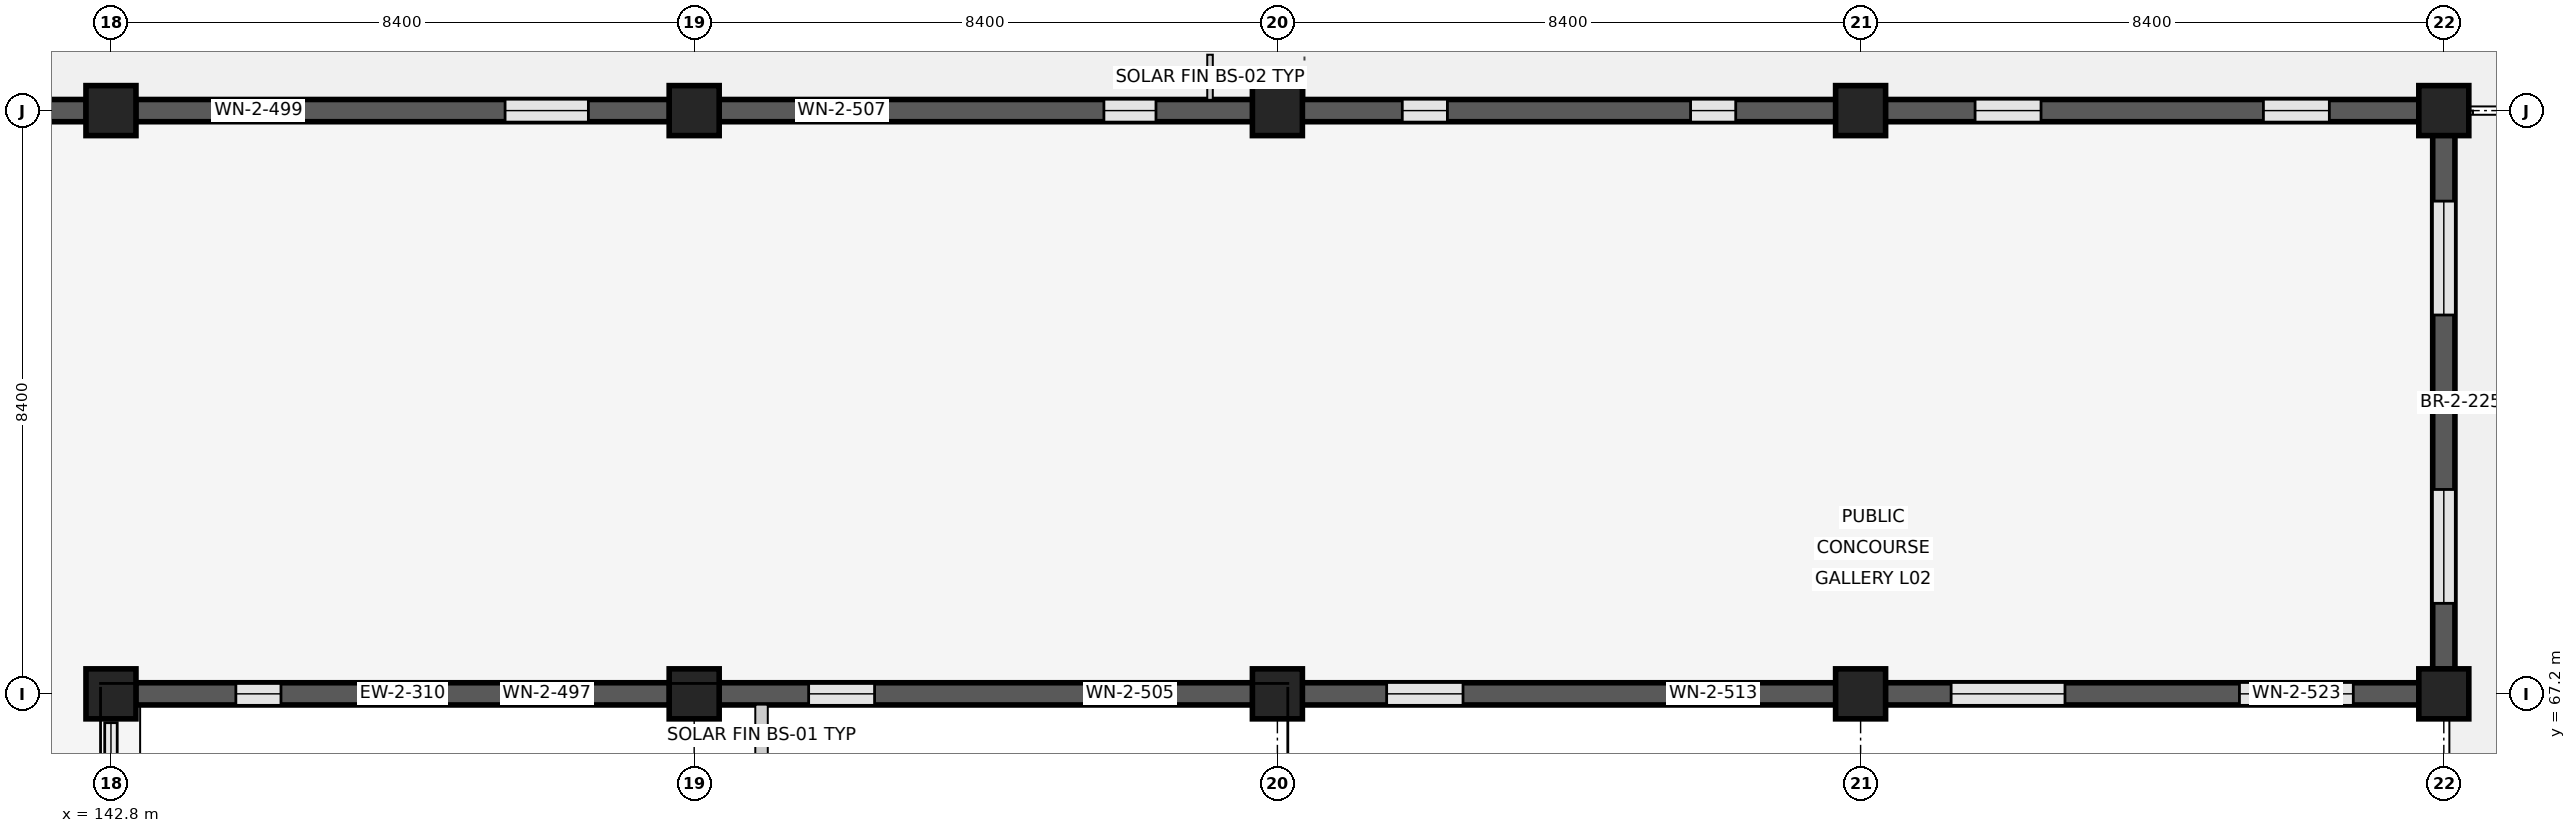
"""IFC4 building model, lengths in metres.
Left out: names, types, materials, properties, quantities, classifications, styles, units other than length and angle.
Written with IfcOpenShell. Run it as: python <this file> out.ifc"""

import sys

from ifc_helpers import new_model, si_unit, direction, frame, frame_2d, origin, origin_2d, place, context, subcontext, project, spatial, rectangle, extrude, element, fill, save


model = new_model("IFC4")
c1 = context("Model", 3, precision=1e-05, world=origin(), true_north=direction((0.0, 1.0)))
c2 = subcontext(c1, "Body", "Model", "MODEL_VIEW")
j1 = project(units=[si_unit("LENGTHUNIT", "METRE"), si_unit("PLANEANGLEUNIT", "RADIAN")], contexts=[c1])
p1 = place(None, origin())
s1 = spatial("IfcSite", under=j1, at=p1, CompositionType="ELEMENT")
p2 = place(p1, origin())
s2 = spatial("IfcBuilding", under=s1, at=p2, CompositionType="ELEMENT")
p3 = place(p2, frame((0.0, 0.0, 8.1)))
s3 = spatial("IfcBuildingStorey", under=s2, at=p3, CompositionType="ELEMENT", Elevation=8.1)
for number, where, z_axis, x_axis in (
    (1, (142.8, 67.2, 0.0), (0.0, 0.0, 1.0), (1.0, 0.0, 0.0)),
    (2, (142.8, 75.6, 0.0), (0.0, 0.0, 1.0), (1.0, 0.0, 0.0)),
    (3, (151.2, 67.2, 0.0), (0.0, 0.0, 1.0), (1.0, 0.0, 0.0)),
    (4, (151.2, 75.6, 0.0), (0.0, 0.0, 1.0), (1.0, 0.0, 0.0)),
    (5, (159.6, 67.2, 0.0), (0.0, 0.0, 1.0), (1.0, 0.0, 0.0)),
    (6, (159.6, 75.6, 0.0), (0.0, 0.0, 1.0), (1.0, 0.0, 0.0)),
    (7, (168.0, 67.2, 0.0), (0.0, 0.0, 1.0), (1.0, 0.0, 0.0)),
    (8, (168.0, 75.6, 0.0), (0.0, 0.0, 1.0), (1.0, 0.0, 0.0)),
    (9, (176.4, 67.2, 0.0), (0.0, 0.0, 1.0), (1.0, 0.0, 0.0)),
    (10, (176.4, 75.6, 0.0), (0.0, 0.0, 1.0), (1.0, 0.0, 0.0)),
):
    element("IfcColumn", number, at=place(p3, frame(where, z_axis=z_axis, x_axis=x_axis)), inside=s3, PredefinedType="COLUMN", context=c2, shape_type="SweptSolid", body=[
        extrude(rectangle(XDim=0.72, YDim=0.72, at=origin_2d()), origin(), (0.0, 0.0, 1.0), 4.8),
    ])
p4 = place(p3, frame((134.755, 75.6, 0.0), z_axis=(0.0, 0.0, 1.0), x_axis=(1.0, 0.0, 0.0)))
e11 = element("IfcWall", 11, at=p4, inside=s3, PredefinedType="SOLIDWALL", context=c2, shape_type="SweptSolid", body=[
    extrude(rectangle(XDim=7.69, YDim=0.32, at=frame_2d((3.845, 0.0))), origin(), (0.0, 0.0, 1.0), 3.86),
])
p5 = place(p4, frame((1.094, 0.0, 0.85)))
e12 = element("IfcOpeningElement", 12, at=p5, cuts=e11, PredefinedType="OPENING", context=c2, shape_type="SweptSolid", body=[
    extrude(rectangle(XDim=1.35, YDim=1.55, at=frame_2d((0.675, 0.775))), frame((0.0, 0.17, 0.0), z_axis=(0.0, -1.0, 0.0), x_axis=(1.0, 0.0, 0.0)), (0.0, 0.0, 1.0), 0.34),
])
p6 = place(p4, frame((5.246, 0.0, 0.85)))
e13 = element("IfcOpeningElement", 13, at=p6, cuts=e11, PredefinedType="OPENING", context=c2, shape_type="SweptSolid", body=[
    extrude(rectangle(XDim=1.35, YDim=1.55, at=frame_2d((0.675, 0.775))), frame((0.0, 0.17, 0.0), z_axis=(0.0, -1.0, 0.0), x_axis=(1.0, 0.0, 0.0)), (0.0, 0.0, 1.0), 0.34),
])
p7 = place(p3, frame((150.845, 67.2, 0.0), z_axis=(0.0, 0.0, 1.0), x_axis=(-1.0, 0.0, 0.0)))
e14 = element("IfcWall", 14, at=p7, inside=s3, PredefinedType="SOLIDWALL", context=c2, shape_type="SweptSolid", body=[
    extrude(rectangle(XDim=7.69, YDim=0.32, at=frame_2d((3.845, 0.0))), origin(), (0.0, 0.0, 1.0), 3.86),
])
p8 = place(p7, frame((1.444, 0.0, 0.85)))
e15 = element("IfcOpeningElement", 15, at=p8, cuts=e14, PredefinedType="OPENING", context=c2, shape_type="SweptSolid", body=[
    extrude(rectangle(XDim=0.65, YDim=1.75, at=frame_2d((0.325, 0.875))), frame((0.0, 0.17, 0.0), z_axis=(0.0, -1.0, 0.0), x_axis=(1.0, 0.0, 0.0)), (0.0, 0.0, 1.0), 0.34),
])
p9 = place(p7, frame((5.596, 0.0, 0.85)))
e16 = element("IfcOpeningElement", 16, at=p9, cuts=e14, PredefinedType="OPENING", context=c2, shape_type="SweptSolid", body=[
    extrude(rectangle(XDim=0.65, YDim=1.75, at=frame_2d((0.325, 0.875))), frame((0.0, 0.17, 0.0), z_axis=(0.0, -1.0, 0.0), x_axis=(1.0, 0.0, 0.0)), (0.0, 0.0, 1.0), 0.34),
])
p10 = place(p3, frame((143.155, 75.6, 0.0), z_axis=(0.0, 0.0, 1.0), x_axis=(1.0, 0.0, 0.0)))
e17 = element("IfcWall", 17, at=p10, inside=s3, PredefinedType="SOLIDWALL", context=c2, shape_type="SweptSolid", body=[
    extrude(rectangle(XDim=7.69, YDim=0.32, at=frame_2d((3.845, 0.0))), origin(), (0.0, 0.0, 1.0), 3.86),
])
p11 = place(p10, frame((1.169, 0.0, 0.85)))
e18 = element("IfcOpeningElement", 18, at=p11, cuts=e17, PredefinedType="OPENING", context=c2, shape_type="SweptSolid", body=[
    extrude(rectangle(XDim=1.2, YDim=1.55, at=frame_2d((0.6, 0.775))), frame((0.0, 0.17, 0.0), z_axis=(0.0, -1.0, 0.0), x_axis=(1.0, 0.0, 0.0)), (0.0, 0.0, 1.0), 0.34),
])
p12 = place(p10, frame((5.321, 0.0, 0.85)))
e19 = element("IfcOpeningElement", 19, at=p12, cuts=e17, PredefinedType="OPENING", context=c2, shape_type="SweptSolid", body=[
    extrude(rectangle(XDim=1.2, YDim=1.55, at=frame_2d((0.6, 0.775))), frame((0.0, 0.17, 0.0), z_axis=(0.0, -1.0, 0.0), x_axis=(1.0, 0.0, 0.0)), (0.0, 0.0, 1.0), 0.34),
])
p13 = place(p3, frame((159.245, 67.2, 0.0), z_axis=(0.0, 0.0, 1.0), x_axis=(-1.0, 0.0, 0.0)))
e20 = element("IfcWall", 20, at=p13, inside=s3, PredefinedType="SOLIDWALL", context=c2, shape_type="SweptSolid", body=[
    extrude(rectangle(XDim=7.69, YDim=0.32, at=frame_2d((3.845, 0.0))), origin(), (0.0, 0.0, 1.0), 3.86),
])
p14 = place(p13, frame((1.294, 0.0, 0.85)))
e21 = element("IfcOpeningElement", 21, at=p14, cuts=e20, PredefinedType="OPENING", context=c2, shape_type="SweptSolid", body=[
    extrude(rectangle(XDim=0.95, YDim=1.6, at=frame_2d((0.475, 0.8))), frame((0.0, 0.17, 0.0), z_axis=(0.0, -1.0, 0.0), x_axis=(1.0, 0.0, 0.0)), (0.0, 0.0, 1.0), 0.34),
])
p15 = place(p13, frame((5.446, 0.0, 0.85)))
e22 = element("IfcOpeningElement", 22, at=p15, cuts=e20, PredefinedType="OPENING", context=c2, shape_type="SweptSolid", body=[
    extrude(rectangle(XDim=0.95, YDim=1.6, at=frame_2d((0.475, 0.8))), frame((0.0, 0.17, 0.0), z_axis=(0.0, -1.0, 0.0), x_axis=(1.0, 0.0, 0.0)), (0.0, 0.0, 1.0), 0.34),
])
p16 = place(p3, frame((151.555, 75.6, 0.0), z_axis=(0.0, 0.0, 1.0), x_axis=(1.0, 0.0, 0.0)))
e23 = element("IfcWall", 23, at=p16, inside=s3, PredefinedType="SOLIDWALL", context=c2, shape_type="SweptSolid", body=[
    extrude(rectangle(XDim=7.69, YDim=0.32, at=frame_2d((3.845, 0.0))), origin(), (0.0, 0.0, 1.0), 3.86),
])
p17 = place(p16, frame((1.394, 0.0, 0.85)))
e24 = element("IfcOpeningElement", 24, at=p17, cuts=e23, PredefinedType="OPENING", context=c2, shape_type="SweptSolid", body=[
    extrude(rectangle(XDim=0.75, YDim=1.85, at=frame_2d((0.375, 0.925))), frame((0.0, 0.17, 0.0), z_axis=(0.0, -1.0, 0.0), x_axis=(1.0, 0.0, 0.0)), (0.0, 0.0, 1.0), 0.34),
])
p18 = place(p16, frame((5.546, 0.0, 0.85)))
e25 = element("IfcOpeningElement", 25, at=p18, cuts=e23, PredefinedType="OPENING", context=c2, shape_type="SweptSolid", body=[
    extrude(rectangle(XDim=0.75, YDim=1.85, at=frame_2d((0.375, 0.925))), frame((0.0, 0.17, 0.0), z_axis=(0.0, -1.0, 0.0), x_axis=(1.0, 0.0, 0.0)), (0.0, 0.0, 1.0), 0.34),
])
p19 = place(p3, frame((167.645, 67.2, 0.0), z_axis=(0.0, 0.0, 1.0), x_axis=(-1.0, 0.0, 0.0)))
e26 = element("IfcWall", 26, at=p19, inside=s3, PredefinedType="SOLIDWALL", context=c2, shape_type="SweptSolid", body=[
    extrude(rectangle(XDim=7.69, YDim=0.32, at=frame_2d((3.845, 0.0))), origin(), (0.0, 0.0, 1.0), 3.86),
])
p20 = place(p19, frame((1.219, 0.0, 0.85)))
e27 = element("IfcOpeningElement", 27, at=p20, cuts=e26, PredefinedType="OPENING", context=c2, shape_type="SweptSolid", body=[
    extrude(rectangle(XDim=1.1, YDim=1.6, at=frame_2d((0.55, 0.8))), frame((0.0, 0.17, 0.0), z_axis=(0.0, -1.0, 0.0), x_axis=(1.0, 0.0, 0.0)), (0.0, 0.0, 1.0), 0.34),
])
p21 = place(p19, frame((5.371, 0.0, 0.85)))
e28 = element("IfcOpeningElement", 28, at=p21, cuts=e26, PredefinedType="OPENING", context=c2, shape_type="SweptSolid", body=[
    extrude(rectangle(XDim=1.1, YDim=1.6, at=frame_2d((0.55, 0.8))), frame((0.0, 0.17, 0.0), z_axis=(0.0, -1.0, 0.0), x_axis=(1.0, 0.0, 0.0)), (0.0, 0.0, 1.0), 0.34),
])
p22 = place(p3, frame((159.955, 75.6, 0.0), z_axis=(0.0, 0.0, 1.0), x_axis=(1.0, 0.0, 0.0)))
e29 = element("IfcWall", 29, at=p22, inside=s3, PredefinedType="SOLIDWALL", context=c2, shape_type="SweptSolid", body=[
    extrude(rectangle(XDim=7.69, YDim=0.32, at=frame_2d((3.845, 0.0))), origin(), (0.0, 0.0, 1.0), 3.86),
])
p23 = place(p22, frame((1.444, 0.0, 0.85)))
e30 = element("IfcOpeningElement", 30, at=p23, cuts=e29, PredefinedType="OPENING", context=c2, shape_type="SweptSolid", body=[
    extrude(rectangle(XDim=0.65, YDim=1.75, at=frame_2d((0.325, 0.875))), frame((0.0, 0.17, 0.0), z_axis=(0.0, -1.0, 0.0), x_axis=(1.0, 0.0, 0.0)), (0.0, 0.0, 1.0), 0.34),
])
p24 = place(p22, frame((5.596, 0.0, 0.85)))
e31 = element("IfcOpeningElement", 31, at=p24, cuts=e29, PredefinedType="OPENING", context=c2, shape_type="SweptSolid", body=[
    extrude(rectangle(XDim=0.65, YDim=1.75, at=frame_2d((0.325, 0.875))), frame((0.0, 0.17, 0.0), z_axis=(0.0, -1.0, 0.0), x_axis=(1.0, 0.0, 0.0)), (0.0, 0.0, 1.0), 0.34),
])
p25 = place(p3, frame((176.045, 67.2, 0.0), z_axis=(0.0, 0.0, 1.0), x_axis=(-1.0, 0.0, 0.0)))
e32 = element("IfcWall", 32, at=p25, inside=s3, PredefinedType="SOLIDWALL", context=c2, shape_type="SweptSolid", body=[
    extrude(rectangle(XDim=7.69, YDim=0.32, at=frame_2d((3.845, 0.0))), origin(), (0.0, 0.0, 1.0), 3.86),
])
p26 = place(p25, frame((0.949, 0.0, 0.85)))
e33 = element("IfcOpeningElement", 33, at=p26, cuts=e32, PredefinedType="OPENING", context=c2, shape_type="SweptSolid", body=[
    extrude(rectangle(XDim=1.64, YDim=1.75, at=frame_2d((0.82, 0.875))), frame((0.0, 0.17, 0.0), z_axis=(0.0, -1.0, 0.0), x_axis=(1.0, 0.0, 0.0)), (0.0, 0.0, 1.0), 0.34),
])
p27 = place(p25, frame((5.101, 0.0, 0.85)))
e34 = element("IfcOpeningElement", 34, at=p27, cuts=e32, PredefinedType="OPENING", context=c2, shape_type="SweptSolid", body=[
    extrude(rectangle(XDim=1.64, YDim=1.75, at=frame_2d((0.82, 0.875))), frame((0.0, 0.17, 0.0), z_axis=(0.0, -1.0, 0.0), x_axis=(1.0, 0.0, 0.0)), (0.0, 0.0, 1.0), 0.34),
])
p28 = place(p3, frame((168.355, 75.6, 0.0), z_axis=(0.0, 0.0, 1.0), x_axis=(1.0, 0.0, 0.0)))
e35 = element("IfcWall", 35, at=p28, inside=s3, PredefinedType="SOLIDWALL", context=c2, shape_type="SweptSolid", body=[
    extrude(rectangle(XDim=7.69, YDim=0.32, at=frame_2d((3.845, 0.0))), origin(), (0.0, 0.0, 1.0), 3.86),
])
p29 = place(p28, frame((1.294, 0.0, 0.85)))
e36 = element("IfcOpeningElement", 36, at=p29, cuts=e35, PredefinedType="OPENING", context=c2, shape_type="SweptSolid", body=[
    extrude(rectangle(XDim=0.95, YDim=1.6, at=frame_2d((0.475, 0.8))), frame((0.0, 0.17, 0.0), z_axis=(0.0, -1.0, 0.0), x_axis=(1.0, 0.0, 0.0)), (0.0, 0.0, 1.0), 0.34),
])
p30 = place(p28, frame((5.446, 0.0, 0.85)))
e37 = element("IfcOpeningElement", 37, at=p30, cuts=e35, PredefinedType="OPENING", context=c2, shape_type="SweptSolid", body=[
    extrude(rectangle(XDim=0.95, YDim=1.6, at=frame_2d((0.475, 0.8))), frame((0.0, 0.17, 0.0), z_axis=(0.0, -1.0, 0.0), x_axis=(1.0, 0.0, 0.0)), (0.0, 0.0, 1.0), 0.34),
])
p31 = place(p3, frame((176.4, 75.245, 0.0), z_axis=(0.0, 0.0, 1.0), x_axis=(0.0, -1.0, 0.0)))
e38 = element("IfcWall", 38, at=p31, inside=s3, PredefinedType="SOLIDWALL", context=c2, shape_type="SweptSolid", body=[
    extrude(rectangle(XDim=7.69, YDim=0.32, at=frame_2d((3.845, 0.0))), origin(), (0.0, 0.0, 1.0), 3.86),
])
p32 = place(p31, frame((0.949, 0.0, 0.85)))
e39 = element("IfcOpeningElement", 39, at=p32, cuts=e38, PredefinedType="OPENING", context=c2, shape_type="SweptSolid", body=[
    extrude(rectangle(XDim=1.64, YDim=1.75, at=frame_2d((0.82, 0.875))), frame((0.0, 0.17, 0.0), z_axis=(0.0, -1.0, 0.0), x_axis=(1.0, 0.0, 0.0)), (0.0, 0.0, 1.0), 0.34),
])
p33 = place(p31, frame((5.101, 0.0, 0.85)))
e40 = element("IfcOpeningElement", 40, at=p33, cuts=e38, PredefinedType="OPENING", context=c2, shape_type="SweptSolid", body=[
    extrude(rectangle(XDim=1.64, YDim=1.75, at=frame_2d((0.82, 0.875))), frame((0.0, 0.17, 0.0), z_axis=(0.0, -1.0, 0.0), x_axis=(1.0, 0.0, 0.0)), (0.0, 0.0, 1.0), 0.34),
])
p34 = place(p3, frame((176.475, 71.4, 0.0), z_axis=(0.0, 0.0, 1.0), x_axis=(1.0, 0.0, 0.0)))
e41 = element("IfcWall", 41, at=p34, inside=s3, PredefinedType="ELEMENTEDWALL", context=c2, shape_type="SweptSolid", body=[
    extrude(rectangle(XDim=0.34, YDim=0.2, at=frame_2d((0.17, 0.0))), origin(), (0.0, 0.0, 1.0), 3.84),
])
p35 = place(p8, origin())
e42 = element("IfcWindow", 42, at=p35, inside=s3, PartitioningType="SINGLE_PANEL", PredefinedType="WINDOW", context=c2, shape_type="SweptSolid", body=[
    extrude(rectangle(XDim=0.65, YDim=1.75, at=frame_2d((0.325, 0.875))), frame((0.0, 0.03, 0.0), z_axis=(0.0, -1.0, 0.0), x_axis=(1.0, 0.0, 0.0)), (0.0, 0.0, 1.0), 0.06),
])
fill(e15, e42)
p36 = place(p9, origin())
e43 = element("IfcWindow", 43, at=p36, inside=s3, PartitioningType="SINGLE_PANEL", PredefinedType="WINDOW", context=c2, shape_type="SweptSolid", body=[
    extrude(rectangle(XDim=0.65, YDim=1.75, at=frame_2d((0.325, 0.875))), frame((0.0, 0.03, 0.0), z_axis=(0.0, -1.0, 0.0), x_axis=(1.0, 0.0, 0.0)), (0.0, 0.0, 1.0), 0.06),
])
fill(e16, e43)
p37 = place(p11, origin())
e44 = element("IfcWindow", 44, at=p37, inside=s3, PartitioningType="SINGLE_PANEL", PredefinedType="WINDOW", context=c2, shape_type="SweptSolid", body=[
    extrude(rectangle(XDim=1.2, YDim=1.55, at=frame_2d((0.6, 0.775))), frame((0.0, 0.03, 0.0), z_axis=(0.0, -1.0, 0.0), x_axis=(1.0, 0.0, 0.0)), (0.0, 0.0, 1.0), 0.06),
])
fill(e18, e44)
p38 = place(p12, origin())
e45 = element("IfcWindow", 45, at=p38, inside=s3, PartitioningType="SINGLE_PANEL", PredefinedType="WINDOW", context=c2, shape_type="SweptSolid", body=[
    extrude(rectangle(XDim=1.2, YDim=1.55, at=frame_2d((0.6, 0.775))), frame((0.0, 0.03, 0.0), z_axis=(0.0, -1.0, 0.0), x_axis=(1.0, 0.0, 0.0)), (0.0, 0.0, 1.0), 0.06),
])
fill(e19, e45)
p39 = place(p14, origin())
e46 = element("IfcWindow", 46, at=p39, inside=s3, PartitioningType="SINGLE_PANEL", PredefinedType="WINDOW", context=c2, shape_type="SweptSolid", body=[
    extrude(rectangle(XDim=0.95, YDim=1.6, at=frame_2d((0.475, 0.8))), frame((0.0, 0.03, 0.0), z_axis=(0.0, -1.0, 0.0), x_axis=(1.0, 0.0, 0.0)), (0.0, 0.0, 1.0), 0.06),
])
fill(e21, e46)
p40 = place(p15, origin())
e47 = element("IfcWindow", 47, at=p40, inside=s3, PartitioningType="SINGLE_PANEL", PredefinedType="WINDOW", context=c2, shape_type="SweptSolid", body=[
    extrude(rectangle(XDim=0.95, YDim=1.6, at=frame_2d((0.475, 0.8))), frame((0.0, 0.03, 0.0), z_axis=(0.0, -1.0, 0.0), x_axis=(1.0, 0.0, 0.0)), (0.0, 0.0, 1.0), 0.06),
])
fill(e22, e47)
p41 = place(p17, origin())
e48 = element("IfcWindow", 48, at=p41, inside=s3, PartitioningType="SINGLE_PANEL", PredefinedType="WINDOW", context=c2, shape_type="SweptSolid", body=[
    extrude(rectangle(XDim=0.75, YDim=1.85, at=frame_2d((0.375, 0.925))), frame((0.0, 0.03, 0.0), z_axis=(0.0, -1.0, 0.0), x_axis=(1.0, 0.0, 0.0)), (0.0, 0.0, 1.0), 0.06),
])
fill(e24, e48)
p42 = place(p18, origin())
e49 = element("IfcWindow", 49, at=p42, inside=s3, PartitioningType="SINGLE_PANEL", PredefinedType="WINDOW", context=c2, shape_type="SweptSolid", body=[
    extrude(rectangle(XDim=0.75, YDim=1.85, at=frame_2d((0.375, 0.925))), frame((0.0, 0.03, 0.0), z_axis=(0.0, -1.0, 0.0), x_axis=(1.0, 0.0, 0.0)), (0.0, 0.0, 1.0), 0.06),
])
fill(e25, e49)
p43 = place(p20, origin())
e50 = element("IfcWindow", 50, at=p43, inside=s3, PartitioningType="SINGLE_PANEL", PredefinedType="WINDOW", context=c2, shape_type="SweptSolid", body=[
    extrude(rectangle(XDim=1.1, YDim=1.6, at=frame_2d((0.55, 0.8))), frame((0.0, 0.03, 0.0), z_axis=(0.0, -1.0, 0.0), x_axis=(1.0, 0.0, 0.0)), (0.0, 0.0, 1.0), 0.06),
])
fill(e27, e50)
p44 = place(p21, origin())
e51 = element("IfcWindow", 51, at=p44, inside=s3, PartitioningType="SINGLE_PANEL", PredefinedType="WINDOW", context=c2, shape_type="SweptSolid", body=[
    extrude(rectangle(XDim=1.1, YDim=1.6, at=frame_2d((0.55, 0.8))), frame((0.0, 0.03, 0.0), z_axis=(0.0, -1.0, 0.0), x_axis=(1.0, 0.0, 0.0)), (0.0, 0.0, 1.0), 0.06),
])
fill(e28, e51)
p45 = place(p23, origin())
e52 = element("IfcWindow", 52, at=p45, inside=s3, PartitioningType="SINGLE_PANEL", PredefinedType="WINDOW", context=c2, shape_type="SweptSolid", body=[
    extrude(rectangle(XDim=0.65, YDim=1.75, at=frame_2d((0.325, 0.875))), frame((0.0, 0.03, 0.0), z_axis=(0.0, -1.0, 0.0), x_axis=(1.0, 0.0, 0.0)), (0.0, 0.0, 1.0), 0.06),
])
fill(e30, e52)
p46 = place(p24, origin())
e53 = element("IfcWindow", 53, at=p46, inside=s3, PartitioningType="SINGLE_PANEL", PredefinedType="WINDOW", context=c2, shape_type="SweptSolid", body=[
    extrude(rectangle(XDim=0.65, YDim=1.75, at=frame_2d((0.325, 0.875))), frame((0.0, 0.03, 0.0), z_axis=(0.0, -1.0, 0.0), x_axis=(1.0, 0.0, 0.0)), (0.0, 0.0, 1.0), 0.06),
])
fill(e31, e53)
p47 = place(p26, origin())
e54 = element("IfcWindow", 54, at=p47, inside=s3, PartitioningType="SINGLE_PANEL", PredefinedType="WINDOW", context=c2, shape_type="SweptSolid", body=[
    extrude(rectangle(XDim=1.64, YDim=1.75, at=frame_2d((0.82, 0.875))), frame((0.0, 0.03, 0.0), z_axis=(0.0, -1.0, 0.0), x_axis=(1.0, 0.0, 0.0)), (0.0, 0.0, 1.0), 0.06),
])
fill(e33, e54)
p48 = place(p27, origin())
e55 = element("IfcWindow", 55, at=p48, inside=s3, PartitioningType="SINGLE_PANEL", PredefinedType="WINDOW", context=c2, shape_type="SweptSolid", body=[
    extrude(rectangle(XDim=1.64, YDim=1.75, at=frame_2d((0.82, 0.875))), frame((0.0, 0.03, 0.0), z_axis=(0.0, -1.0, 0.0), x_axis=(1.0, 0.0, 0.0)), (0.0, 0.0, 1.0), 0.06),
])
fill(e34, e55)
p49 = place(p29, origin())
e56 = element("IfcWindow", 56, at=p49, inside=s3, PartitioningType="SINGLE_PANEL", PredefinedType="WINDOW", context=c2, shape_type="SweptSolid", body=[
    extrude(rectangle(XDim=0.95, YDim=1.6, at=frame_2d((0.475, 0.8))), frame((0.0, 0.03, 0.0), z_axis=(0.0, -1.0, 0.0), x_axis=(1.0, 0.0, 0.0)), (0.0, 0.0, 1.0), 0.06),
])
fill(e36, e56)
p50 = place(p30, origin())
e57 = element("IfcWindow", 57, at=p50, inside=s3, PartitioningType="SINGLE_PANEL", PredefinedType="WINDOW", context=c2, shape_type="SweptSolid", body=[
    extrude(rectangle(XDim=0.95, YDim=1.6, at=frame_2d((0.475, 0.8))), frame((0.0, 0.03, 0.0), z_axis=(0.0, -1.0, 0.0), x_axis=(1.0, 0.0, 0.0)), (0.0, 0.0, 1.0), 0.06),
])
fill(e37, e57)
p51 = place(p32, origin())
e58 = element("IfcWindow", 58, at=p51, inside=s3, PartitioningType="SINGLE_PANEL", PredefinedType="WINDOW", context=c2, shape_type="SweptSolid", body=[
    extrude(rectangle(XDim=1.64, YDim=1.75, at=frame_2d((0.82, 0.875))), frame((0.0, 0.03, 0.0), z_axis=(0.0, -1.0, 0.0), x_axis=(1.0, 0.0, 0.0)), (0.0, 0.0, 1.0), 0.06),
])
fill(e39, e58)
p52 = place(p33, origin())
e59 = element("IfcWindow", 59, at=p52, inside=s3, PartitioningType="SINGLE_PANEL", PredefinedType="WINDOW", context=c2, shape_type="SweptSolid", body=[
    extrude(rectangle(XDim=1.64, YDim=1.75, at=frame_2d((0.82, 0.875))), frame((0.0, 0.03, 0.0), z_axis=(0.0, -1.0, 0.0), x_axis=(1.0, 0.0, 0.0)), (0.0, 0.0, 1.0), 0.06),
])
fill(e40, e59)
save(model, sys.argv[1])
